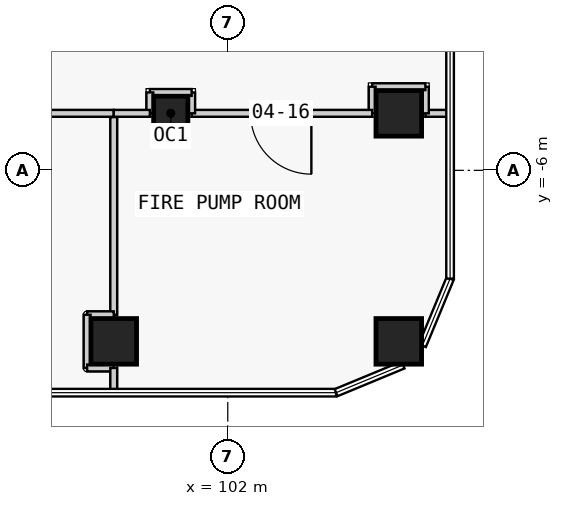
"""IFC4 building model, lengths in metres.
Left out: names, types, materials, properties, quantities, classifications, styles, units other than length and angle.
Written with IfcOpenShell. Run it as: python <this file> out.ifc"""

import sys

from ifc_helpers import new_model, si_unit, direction, frame, frame_2d, origin, origin_2d, place, context, subcontext, project, spatial, rectangle, extrude, element, fill, save


model = new_model("IFC4")
c1 = context("Model", 3, precision=1e-05, world=origin(), true_north=direction((0.0, 1.0)))
c2 = subcontext(c1, "Body", "Model", "MODEL_VIEW")
j1 = project(units=[si_unit("LENGTHUNIT", "METRE"), si_unit("PLANEANGLEUNIT", "RADIAN")], contexts=[c1])
p1 = place(None, origin())
s1 = spatial("IfcSite", under=j1, at=p1, CompositionType="ELEMENT")
p2 = place(p1, origin())
s2 = spatial("IfcBuilding", under=s1, at=p2, CompositionType="ELEMENT")
p3 = place(p2, frame((0.0, 0.0, 21.8)))
s3 = spatial("IfcBuildingStorey", under=s2, at=p3, CompositionType="ELEMENT", Elevation=21.8)
for number, where, z_axis, x_axis in (
    (1, (99.0, -10.5, 0.0), (0.0, 0.0, 1.0), (1.0, 0.0, 0.0)),
    (2, (106.5, -10.5, 0.0), (0.0, 0.0, 1.0), (1.0, 0.0, 0.0)),
    (3, (106.5, -4.5, 0.0), (0.0, 0.0, 1.0), (1.0, 0.0, 0.0)),
):
    element("IfcColumn", number, at=place(p3, frame(where, z_axis=z_axis, x_axis=x_axis)), inside=s3, PredefinedType="COLUMN", context=c2, shape_type="SweptSolid", body=[
        extrude(rectangle(XDim=1.2, YDim=1.2, at=origin_2d()), origin(), (0.0, 0.0, 1.0), 5.0),
    ])
p4 = place(p3, frame((100.5, -4.5, 0.0), z_axis=(0.0, 0.0, 1.0), x_axis=(1.0, 0.0, 0.0)))
e4 = element("IfcColumn", 4, at=p4, inside=s3, PredefinedType="COLUMN", context=c2, shape_type="SweptSolid", body=[
    extrude(rectangle(XDim=0.9, YDim=0.9, at=origin_2d()), origin(), (0.0, 0.0, 1.0), 5.0),
])
p5 = place(p3, frame((99.0, -4.5, 0.0), z_axis=(0.0, 0.0, 1.0), x_axis=(-1.0, 0.0, 0.0)))
e5 = element("IfcWall", 5, at=p5, inside=s3, PredefinedType="PARTITIONING", context=c2, shape_type="SweptSolid", body=[
    extrude(rectangle(XDim=6.95, YDim=0.18, at=frame_2d((3.475, 0.0))), origin(), (0.0, 0.0, 1.0), 3.7),
])
p6 = place(p3, frame((107.85, -4.5, 0.0), z_axis=(0.0, 0.0, 1.0), x_axis=(-1.0, 0.0, 0.0)))
e6 = element("IfcWall", 6, at=p6, inside=s3, PredefinedType="PARTITIONING", context=c2, shape_type="SweptSolid", body=[
    extrude(rectangle(XDim=0.65, YDim=0.18, at=frame_2d((0.325, 0.0))), origin(), (0.0, 0.0, 1.0), 4.5),
])
p7 = place(p3, frame((107.2, -4.5, 0.0), z_axis=(0.0, 0.0, 1.0), x_axis=(0.0, 1.0, 0.0)))
e7 = element("IfcWall", 7, at=p7, inside=s3, PredefinedType="PARTITIONING", context=c2, shape_type="SweptSolid", body=[
    extrude(rectangle(XDim=0.7, YDim=0.18, at=frame_2d((0.35, 0.0))), origin(), (0.0, 0.0, 1.0), 4.5),
])
p8 = place(p3, frame((107.2, -3.8, 0.0), z_axis=(0.0, 0.0, 1.0), x_axis=(-1.0, 0.0, 0.0)))
e8 = element("IfcWall", 8, at=p8, inside=s3, PredefinedType="PARTITIONING", context=c2, shape_type="SweptSolid", body=[
    extrude(rectangle(XDim=1.4, YDim=0.18, at=frame_2d((0.7, 0.0))), origin(), (0.0, 0.0, 1.0), 4.5),
])
p9 = place(p3, frame((105.8, -3.8, 0.0), z_axis=(0.0, 0.0, 1.0), x_axis=(0.0, -1.0, 0.0)))
e9 = element("IfcWall", 9, at=p9, inside=s3, PredefinedType="PARTITIONING", context=c2, shape_type="SweptSolid", body=[
    extrude(rectangle(XDim=0.7, YDim=0.18, at=frame_2d((0.35, 0.0))), origin(), (0.0, 0.0, 1.0), 4.5),
])
p10 = place(p3, frame((105.8, -4.5, 0.0), z_axis=(0.0, 0.0, 1.0), x_axis=(-1.0, 0.0, 0.0)))
e10 = element("IfcWall", 10, at=p10, inside=s3, PredefinedType="PARTITIONING", context=c2, shape_type="SweptSolid", body=[
    extrude(rectangle(XDim=4.75, YDim=0.18, at=frame_2d((2.375, 0.0))), origin(), (0.0, 0.0, 1.0), 4.5),
])
p11 = place(p10, frame((1.6, 0.0, 0.0)))
e11 = element("IfcOpeningElement", 11, at=p11, cuts=e10, PredefinedType="OPENING", context=c2, shape_type="SweptSolid", body=[
    extrude(rectangle(XDim=1.6, YDim=2.4, at=frame_2d((0.8, 1.2))), frame((0.0, 0.1, 0.0), z_axis=(0.0, -1.0, 0.0), x_axis=(1.0, 0.0, 0.0)), (0.0, 0.0, 1.0), 0.2),
])
p12 = place(p3, frame((101.05, -4.5, 0.0), z_axis=(0.0, 0.0, 1.0), x_axis=(0.0, 1.0, 0.0)))
e12 = element("IfcWall", 12, at=p12, inside=s3, PredefinedType="PARTITIONING", context=c2, shape_type="SweptSolid", body=[
    extrude(rectangle(XDim=0.55, YDim=0.18, at=frame_2d((0.275, 0.0))), origin(), (0.0, 0.0, 1.0), 4.5),
])
p13 = place(p3, frame((101.05, -3.95, 0.0), z_axis=(0.0, 0.0, 1.0), x_axis=(-1.0, 0.0, 0.0)))
e13 = element("IfcWall", 13, at=p13, inside=s3, PredefinedType="PARTITIONING", context=c2, shape_type="SweptSolid", body=[
    extrude(rectangle(XDim=1.1, YDim=0.18, at=frame_2d((0.55, 0.0))), origin(), (0.0, 0.0, 1.0), 3.7),
])
p14 = place(p3, frame((99.95, -3.95, 0.0), z_axis=(0.0, 0.0, 1.0), x_axis=(0.0, -1.0, 0.0)))
e14 = element("IfcWall", 14, at=p14, inside=s3, PredefinedType="PARTITIONING", context=c2, shape_type="SweptSolid", body=[
    extrude(rectangle(XDim=0.55, YDim=0.18, at=frame_2d((0.275, 0.0))), origin(), (0.0, 0.0, 1.0), 3.7),
])
p15 = place(p3, frame((99.95, -4.5, 0.0), z_axis=(0.0, 0.0, 1.0), x_axis=(-1.0, 0.0, 0.0)))
e15 = element("IfcWall", 15, at=p15, inside=s3, PredefinedType="PARTITIONING", context=c2, shape_type="SweptSolid", body=[
    extrude(rectangle(XDim=0.95, YDim=0.18, at=frame_2d((0.475, 0.0))), origin(), (0.0, 0.0, 1.0), 3.7),
])
p16 = place(p3, frame((99.0, -4.6, 0.0), z_axis=(0.0, 0.0, 1.0), x_axis=(0.0, -1.0, 0.0)))
e16 = element("IfcWall", 16, at=p16, inside=s3, PredefinedType="PARTITIONING", context=c2, shape_type="SweptSolid", body=[
    extrude(rectangle(XDim=5.2, YDim=0.18, at=frame_2d((2.6, 0.0))), origin(), (0.0, 0.0, 1.0), 4.5),
])
p17 = place(p3, frame((99.0, -9.8, 0.0), z_axis=(0.0, 0.0, 1.0), x_axis=(-1.0, 0.0, 0.0)))
e17 = element("IfcWall", 17, at=p17, inside=s3, PredefinedType="PARTITIONING", context=c2, shape_type="SweptSolid", body=[
    extrude(rectangle(XDim=0.7, YDim=0.18, at=frame_2d((0.35, 0.0))), origin(), (0.0, 0.0, 1.0), 4.5),
])
p18 = place(p3, frame((98.3, -9.8, 0.0), z_axis=(0.0, 0.0, 1.0), x_axis=(0.0, -1.0, 0.0)))
e18 = element("IfcWall", 18, at=p18, inside=s3, PredefinedType="PARTITIONING", context=c2, shape_type="SweptSolid", body=[
    extrude(rectangle(XDim=1.4, YDim=0.18, at=frame_2d((0.7, 0.0))), origin(), (0.0, 0.0, 1.0), 4.5),
])
p19 = place(p3, frame((98.3, -11.2, 0.0), z_axis=(0.0, 0.0, 1.0), x_axis=(1.0, 0.0, 0.0)))
e19 = element("IfcWall", 19, at=p19, inside=s3, PredefinedType="PARTITIONING", context=c2, shape_type="SweptSolid", body=[
    extrude(rectangle(XDim=0.7, YDim=0.18, at=frame_2d((0.35, 0.0))), origin(), (0.0, 0.0, 1.0), 4.5),
])
p20 = place(p3, frame((99.0, -11.2, 0.0), z_axis=(0.0, 0.0, 1.0), x_axis=(0.0, -1.0, 0.0)))
e20 = element("IfcWall", 20, at=p20, inside=s3, PredefinedType="PARTITIONING", context=c2, shape_type="SweptSolid", body=[
    extrude(rectangle(XDim=0.65, YDim=0.18, at=frame_2d((0.325, 0.0))), origin(), (0.0, 0.0, 1.0), 4.5),
])
p21 = place(p11, origin())
e21 = element("IfcDoor", 21, at=p21, inside=s3, OperationType="SINGLE_SWING_LEFT", PredefinedType="DOOR", context=c2, shape_type="SweptSolid", body=[
    extrude(rectangle(XDim=1.6, YDim=2.4, at=frame_2d((0.8, 1.2))), frame((0.0, 0.025, 0.0), z_axis=(0.0, -1.0, 0.0), x_axis=(1.0, 0.0, 0.0)), (0.0, 0.0, 1.0), 0.05),
])
fill(e11, e21)
save(model, sys.argv[1])
